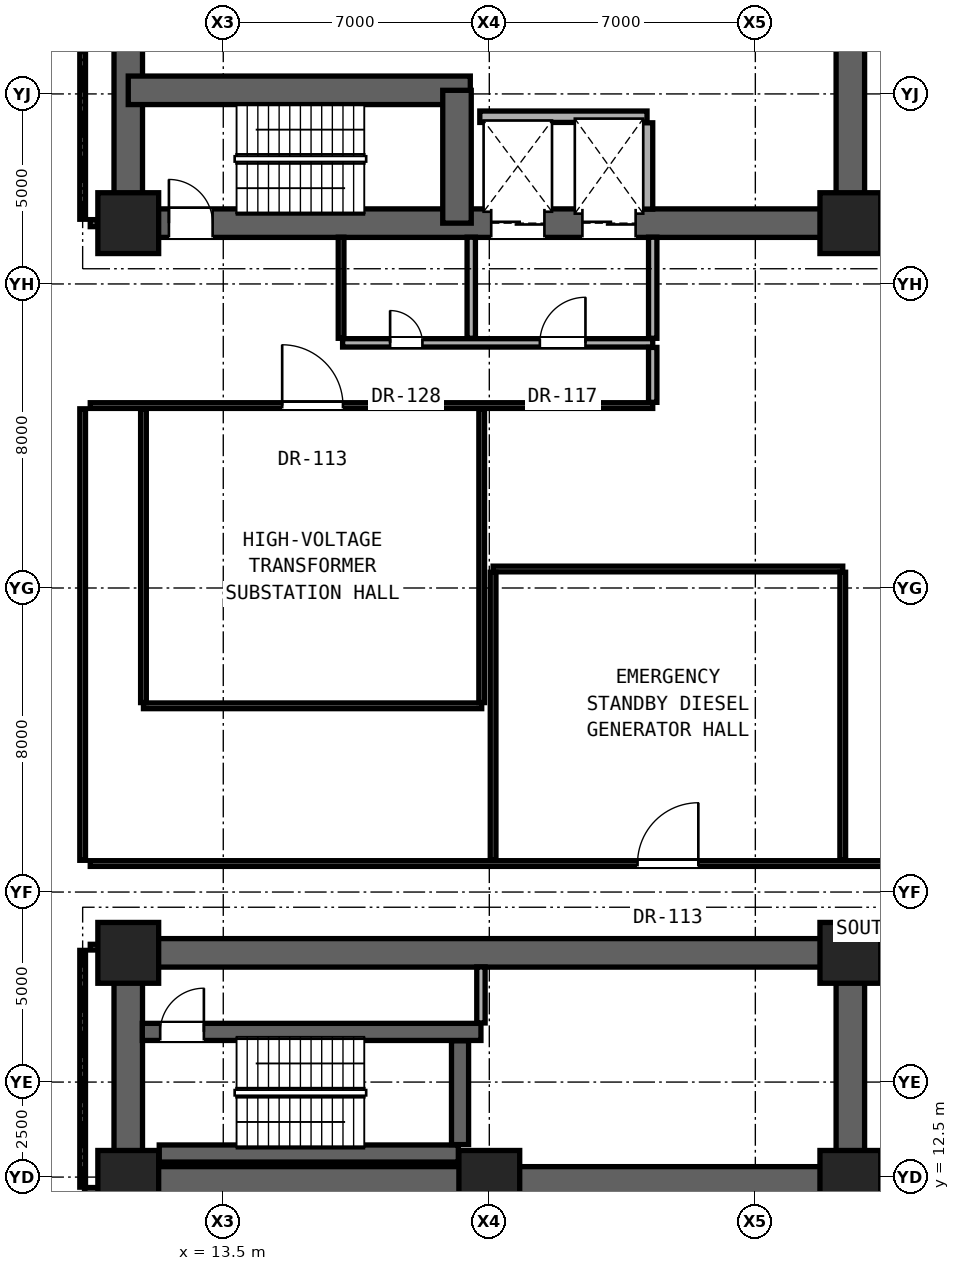
"""IFC4 building model, lengths in metres.
Left out: names, types, materials, properties, quantities, classifications, styles, units other than length and angle.
Written with IfcOpenShell. Run it as: python <this file> out.ifc"""

import sys

from ifc_helpers import new_model, si_unit, direction, frame, frame_2d, origin, origin_2d, place, context, subcontext, project, spatial, rectangle, extrude, element, fill, save


model = new_model("IFC4")
c1 = context("Model", 3, precision=1e-05, world=origin(), true_north=direction((0.0, 1.0)))
c2 = subcontext(c1, "Body", "Model", "MODEL_VIEW")
j1 = project(units=[si_unit("LENGTHUNIT", "METRE"), si_unit("PLANEANGLEUNIT", "RADIAN")], contexts=[c1])
p1 = place(None, origin())
s1 = spatial("IfcSite", under=j1, at=p1, CompositionType="ELEMENT")
p2 = place(p1, origin())
s2 = spatial("IfcBuilding", under=s1, at=p2, CompositionType="ELEMENT")
p3 = place(p2, frame((0.0, 0.0, -4.8)))
s3 = spatial("IfcBuildingStorey", under=s2, at=p3, CompositionType="ELEMENT", Elevation=-4.8)
for number, where, z_axis, x_axis in (
    (1, (11.0, 12.4, 0.0), (0.0, 0.0, 1.0), (1.0, 0.0, 0.0)),
    (2, (20.5, 12.4, 0.0), (0.0, 0.0, 1.0), (1.0, 0.0, 0.0)),
    (3, (30.0, 12.4, 0.0), (0.0, 0.0, 1.0), (1.0, 0.0, 0.0)),
    (4, (11.0, 18.4, 0.0), (0.0, 0.0, 1.0), (1.0, 0.0, 0.0)),
    (5, (30.0, 18.4, 0.0), (0.0, 0.0, 1.0), (1.0, 0.0, 0.0)),
    (6, (11.0, 37.6, 0.0), (0.0, 0.0, 1.0), (1.0, 0.0, 0.0)),
    (7, (30.0, 37.6, 0.0), (0.0, 0.0, 1.0), (1.0, 0.0, 0.0)),
):
    element("IfcColumn", number, at=place(p3, frame(where, z_axis=z_axis, x_axis=x_axis)), inside=s3, PredefinedType="COLUMN", context=c2, shape_type="SweptSolid", body=[
        extrude(rectangle(XDim=1.6, YDim=1.6, at=origin_2d()), origin(), (0.0, 0.0, 1.0), 4.8),
    ])
for number, where, z_axis, x_axis in (
    (8, (11.0, 37.6, 0.0), (0.0, 0.0, 1.0), (0.0, 1.0, 0.0)),
    (9, (30.0, 37.6, 0.0), (0.0, 0.0, 1.0), (0.0, 1.0, 0.0)),
):
    element("IfcWall", number, at=place(p3, frame(where, z_axis=z_axis, x_axis=x_axis)), inside=s3, PredefinedType="SHEAR", context=c2, shape_type="SweptSolid", body=[
        extrude(rectangle(XDim=6.0, YDim=0.75, at=frame_2d((3.0, 0.0))), origin(), (0.0, 0.0, 1.0), 4.48),
    ])
p4 = place(p3, frame((11.0, 37.6, 0.0), z_axis=(0.0, 0.0, 1.0), x_axis=(1.0, 0.0, 0.0)))
e10 = element("IfcWall", 10, at=p4, inside=s3, PredefinedType="SHEAR", context=c2, shape_type="SweptSolid", body=[
    extrude(rectangle(XDim=19.0, YDim=0.75, at=frame_2d((9.5, 0.0))), origin(), (0.0, 0.0, 1.0), 4.48),
])
p5 = place(p4, frame((1.07, 0.0, 0.0)))
e11 = element("IfcOpeningElement", 11, at=p5, cuts=e10, PredefinedType="OPENING", context=c2, shape_type="SweptSolid", body=[
    extrude(rectangle(XDim=1.15, YDim=2.2, at=frame_2d((0.575, 1.1))), frame((0.0, 0.385, 0.0), z_axis=(0.0, -1.0, 0.0), x_axis=(1.0, 0.0, 0.0)), (0.0, 0.0, 1.0), 0.77),
])
p6 = place(p4, frame((9.55, 0.0, 0.0)))
e12 = element("IfcOpeningElement", 12, at=p6, cuts=e10, PredefinedType="OPENING", context=c2, shape_type="SweptSolid", body=[
    extrude(rectangle(XDim=1.4, YDim=2.35, at=frame_2d((0.7, 1.175))), frame((0.0, 0.385, 0.0), z_axis=(0.0, -1.0, 0.0), x_axis=(1.0, 0.0, 0.0)), (0.0, 0.0, 1.0), 0.77),
])
p7 = place(p4, frame((11.95, 0.0, 0.0)))
e13 = element("IfcOpeningElement", 13, at=p7, cuts=e10, PredefinedType="OPENING", context=c2, shape_type="SweptSolid", body=[
    extrude(rectangle(XDim=1.4, YDim=2.35, at=frame_2d((0.7, 1.175))), frame((0.0, 0.385, 0.0), z_axis=(0.0, -1.0, 0.0), x_axis=(1.0, 0.0, 0.0)), (0.0, 0.0, 1.0), 0.77),
])
p8 = place(p3, frame((11.0, 41.095, 0.0), z_axis=(0.0, 0.0, 1.0), x_axis=(1.0, 0.0, 0.0)))
e14 = element("IfcWall", 14, at=p8, inside=s3, PredefinedType="SHEAR", context=c2, shape_type="SweptSolid", body=[
    extrude(rectangle(XDim=9.0, YDim=0.75, at=frame_2d((4.5, 0.0))), origin(), (0.0, 0.0, 1.0), 4.48),
])
p9 = place(p3, frame((19.65, 37.6, 0.0), z_axis=(0.0, 0.0, 1.0), x_axis=(0.0, 1.0, 0.0)))
e15 = element("IfcWall", 15, at=p9, inside=s3, PredefinedType="SHEAR", context=c2, shape_type="SweptSolid", body=[
    extrude(rectangle(XDim=3.495, YDim=0.75, at=frame_2d((1.748, 0.0))), origin(), (0.0, 0.0, 1.0), 4.48),
])
p10 = place(p3, frame((11.0, 12.4, 0.0), z_axis=(0.0, 0.0, 1.0), x_axis=(1.0, 0.0, 0.0)))
e16 = element("IfcWall", 16, at=p10, inside=s3, PredefinedType="SHEAR", context=c2, shape_type="SweptSolid", body=[
    extrude(rectangle(XDim=19.0, YDim=0.75, at=frame_2d((9.5, 0.0))), origin(), (0.0, 0.0, 1.0), 4.48),
])
for number, where, z_axis, x_axis in (
    (17, (11.0, 12.4, 0.0), (0.0, 0.0, 1.0), (0.0, 1.0, 0.0)),
    (18, (30.0, 12.4, 0.0), (0.0, 0.0, 1.0), (0.0, 1.0, 0.0)),
):
    element("IfcWall", number, at=place(p3, frame(where, z_axis=z_axis, x_axis=x_axis)), inside=s3, PredefinedType="SHEAR", context=c2, shape_type="SweptSolid", body=[
        extrude(rectangle(XDim=6.0, YDim=0.75, at=frame_2d((3.0, 0.0))), origin(), (0.0, 0.0, 1.0), 4.48),
    ])
p11 = place(p3, frame((11.0, 18.4, 0.0), z_axis=(0.0, 0.0, 1.0), x_axis=(1.0, 0.0, 0.0)))
e19 = element("IfcWall", 19, at=p11, inside=s3, PredefinedType="SHEAR", context=c2, shape_type="SweptSolid", body=[
    extrude(rectangle(XDim=19.0, YDim=0.75, at=frame_2d((9.5, 0.0))), origin(), (0.0, 0.0, 1.0), 4.48),
])
p12 = place(p3, frame((9.85, 12.15, 0.0), z_axis=(0.0, 0.0, 1.0), x_axis=(1.0, 0.0, 0.0)))
e20 = element("IfcWall", 20, at=p12, inside=s3, PredefinedType="PARTITIONING", context=c2, shape_type="SweptSolid", body=[
    extrude(rectangle(XDim=1.13, YDim=0.15, at=frame_2d((0.565, 0.0))), origin(), (0.0, 0.0, 1.0), 3.519),
])
p13 = place(p3, frame((30.02, 12.15, 0.0), z_axis=(0.0, 0.0, 1.0), x_axis=(1.0, 0.0, 0.0)))
e21 = element("IfcWall", 21, at=p13, inside=s3, PredefinedType="PARTITIONING", context=c2, shape_type="SweptSolid", body=[
    extrude(rectangle(XDim=13.13, YDim=0.15, at=frame_2d((6.565, 0.0))), origin(), (0.0, 0.0, 1.0), 3.252),
])
p14 = place(p3, frame((11.815, 13.12, 0.0), z_axis=(0.0, 0.0, 1.0), x_axis=(1.0, 0.0, 0.0)))
e22 = element("IfcWall", 22, at=p14, inside=s3, PredefinedType="SHEAR", context=c2, shape_type="SweptSolid", body=[
    extrude(rectangle(XDim=7.87, YDim=0.45, at=frame_2d((3.935, 0.0))), origin(), (0.0, 0.0, 1.0), 4.48),
])
p15 = place(p3, frame((11.37, 16.32, 0.0), z_axis=(0.0, 0.0, 1.0), x_axis=(1.0, 0.0, 0.0)))
e23 = element("IfcWall", 23, at=p15, inside=s3, PredefinedType="SHEAR", context=c2, shape_type="SweptSolid", body=[
    extrude(rectangle(XDim=8.91, YDim=0.45, at=frame_2d((4.455, 0.0))), origin(), (0.0, 0.0, 1.0), 4.48),
])
p16 = place(p15, frame((0.47, 0.0, 0.0)))
e24 = element("IfcOpeningElement", 24, at=p16, cuts=e23, PredefinedType="OPENING", context=c2, shape_type="SweptSolid", body=[
    extrude(rectangle(XDim=1.15, YDim=2.2, at=frame_2d((0.575, 1.1))), frame((0.0, 0.235, 0.0), z_axis=(0.0, -1.0, 0.0), x_axis=(1.0, 0.0, 0.0)), (0.0, 0.0, 1.0), 0.47),
])
p17 = place(p3, frame((10.0, 18.55, 0.0), z_axis=(0.0, 0.0, 1.0), x_axis=(1.0, 0.0, 0.0)))
e25 = element("IfcWall", 25, at=p17, inside=s3, PredefinedType="PARTITIONING", context=c2, shape_type="SweptSolid", body=[
    extrude(rectangle(XDim=0.98, YDim=0.15, at=frame_2d((0.49, 0.0))), origin(), (0.0, 0.0, 1.0), 3.372),
])
p18 = place(p3, frame((30.02, 18.55, 0.0), z_axis=(0.0, 0.0, 1.0), x_axis=(1.0, 0.0, 0.0)))
e26 = element("IfcWall", 26, at=p18, inside=s3, PredefinedType="PARTITIONING", context=c2, shape_type="SweptSolid", body=[
    extrude(rectangle(XDim=13.18, YDim=0.15, at=frame_2d((6.59, 0.0))), origin(), (0.0, 0.0, 1.0), 3.252),
])
p19 = place(p3, frame((10.0, 20.75, 0.0), z_axis=(0.0, 0.0, 1.0), x_axis=(1.0, 0.0, 0.0)))
e27 = element("IfcWall", 27, at=p19, inside=s3, PredefinedType="PARTITIONING", context=c2, shape_type="SweptSolid", body=[
    extrude(rectangle(XDim=33.2, YDim=0.15, at=frame_2d((16.6, 0.0))), origin(), (0.0, 0.0, 1.0), 3.252),
])
p20 = place(p19, frame((14.4, 0.0, 0.0)))
e28 = element("IfcOpeningElement", 28, at=p20, cuts=e27, PredefinedType="OPENING", context=c2, shape_type="SweptSolid", body=[
    extrude(rectangle(XDim=1.6, YDim=2.3, at=frame_2d((0.8, 1.15))), frame((0.0, 0.085, 0.0), z_axis=(0.0, -1.0, 0.0), x_axis=(1.0, 0.0, 0.0)), (0.0, 0.0, 1.0), 0.17),
])
p21 = place(p3, frame((11.4, 24.9, 0.0), z_axis=(0.0, 0.0, 1.0), x_axis=(1.0, 0.0, 0.0)))
e29 = element("IfcWall", 29, at=p21, inside=s3, PredefinedType="PARTITIONING", context=c2, shape_type="SweptSolid", body=[
    extrude(rectangle(XDim=8.9, YDim=0.15, at=frame_2d((4.45, 0.0))), origin(), (0.0, 0.0, 1.0), 3.432),
])
p22 = place(p3, frame((20.6, 28.5, 0.0), z_axis=(0.0, 0.0, 1.0), x_axis=(1.0, 0.0, 0.0)))
e30 = element("IfcWall", 30, at=p22, inside=s3, PredefinedType="PARTITIONING", context=c2, shape_type="SweptSolid", body=[
    extrude(rectangle(XDim=9.2, YDim=0.15, at=frame_2d((4.6, 0.0))), origin(), (0.0, 0.0, 1.0), 3.432),
])
p23 = place(p3, frame((10.0, 32.8, 0.0), z_axis=(0.0, 0.0, 1.0), x_axis=(1.0, 0.0, 0.0)))
e31 = element("IfcWall", 31, at=p23, inside=s3, PredefinedType="PARTITIONING", context=c2, shape_type="SweptSolid", body=[
    extrude(rectangle(XDim=14.8, YDim=0.15, at=frame_2d((7.4, 0.0))), origin(), (0.0, 0.0, 1.0), 3.432),
])
p24 = place(p23, frame((5.05, 0.0, 0.0)))
e32 = element("IfcOpeningElement", 32, at=p24, cuts=e31, PredefinedType="OPENING", context=c2, shape_type="SweptSolid", body=[
    extrude(rectangle(XDim=1.6, YDim=2.3, at=frame_2d((0.8, 1.15))), frame((0.0, 0.085, 0.0), z_axis=(0.0, -1.0, 0.0), x_axis=(1.0, 0.0, 0.0)), (0.0, 0.0, 1.0), 0.17),
])
p25 = place(p3, frame((16.64, 34.45, 0.0), z_axis=(0.0, 0.0, 1.0), x_axis=(1.0, 0.0, 0.0)))
e33 = element("IfcWall", 33, at=p25, inside=s3, PredefinedType="SOLIDWALL", context=c2, shape_type="SweptSolid", body=[
    extrude(rectangle(XDim=8.16, YDim=0.22, at=frame_2d((4.08, 0.0))), origin(), (0.0, 0.0, 1.0), 4.009),
])
p26 = place(p25, frame((5.19, 0.0, 0.0)))
e34 = element("IfcOpeningElement", 34, at=p26, cuts=e33, PredefinedType="OPENING", context=c2, shape_type="SweptSolid", body=[
    extrude(rectangle(XDim=1.2, YDim=2.25, at=frame_2d((0.6, 1.125))), frame((0.0, 0.12, 0.0), z_axis=(0.0, -1.0, 0.0), x_axis=(1.0, 0.0, 0.0)), (0.0, 0.0, 1.0), 0.24),
])
p27 = place(p25, frame((1.25, 0.0, 0.0)))
e35 = element("IfcOpeningElement", 35, at=p27, cuts=e33, PredefinedType="OPENING", context=c2, shape_type="SweptSolid", body=[
    extrude(rectangle(XDim=0.85, YDim=2.01, at=frame_2d((0.425, 1.005))), frame((0.0, 0.12, 0.0), z_axis=(0.0, -1.0, 0.0), x_axis=(1.0, 0.0, 0.0)), (0.0, 0.0, 1.0), 0.24),
])
p28 = place(p3, frame((10.0, 37.6, 0.0), z_axis=(0.0, 0.0, 1.0), x_axis=(1.0, 0.0, 0.0)))
e36 = element("IfcWall", 36, at=p28, inside=s3, PredefinedType="SHEAR", context=c2, shape_type="SweptSolid", body=[
    extrude(rectangle(XDim=0.185, YDim=0.185, at=frame_2d((0.093, 0.0))), origin(), (0.0, 0.0, 1.0), 4.48),
])
p29 = place(p3, frame((20.25, 40.4, 0.0), z_axis=(0.0, 0.0, 1.0), x_axis=(1.0, 0.0, 0.0)))
e37 = element("IfcWall", 37, at=p29, inside=s3, PredefinedType="SOLIDWALL", context=c2, shape_type="SweptSolid", body=[
    extrude(rectangle(XDim=4.4, YDim=0.3, at=frame_2d((2.2, 0.0))), origin(), (0.0, 0.0, 1.0), 4.3),
])
p30 = place(p3, frame((9.8, 12.235, 0.0), z_axis=(0.0, 0.0, 1.0), x_axis=(0.0, 1.0, 0.0)))
e38 = element("IfcWall", 38, at=p30, inside=s3, PredefinedType="PARTITIONING", context=c2, shape_type="SweptSolid", body=[
    extrude(rectangle(XDim=6.23, YDim=0.15, at=frame_2d((3.115, 0.0))), origin(), (0.0, 0.0, 1.0), 3.372),
])
p31 = place(p3, frame((9.8, 20.835, 0.0), z_axis=(0.0, 0.0, 1.0), x_axis=(0.0, 1.0, 0.0)))
e39 = element("IfcWall", 39, at=p31, inside=s3, PredefinedType="PARTITIONING", context=c2, shape_type="SweptSolid", body=[
    extrude(rectangle(XDim=11.88, YDim=0.15, at=frame_2d((5.94, 0.0))), origin(), (0.0, 0.0, 1.0), 3.699),
])
p32 = place(p3, frame((9.8, 37.702, 0.0), z_axis=(0.0, 0.0, 1.0), x_axis=(0.0, 1.0, 0.0)))
e40 = element("IfcWall", 40, at=p32, inside=s3, PredefinedType="PARTITIONING", context=c2, shape_type="SweptSolid", body=[
    extrude(rectangle(XDim=9.348, YDim=0.15, at=frame_2d((4.674, 0.0))), origin(), (0.0, 0.0, 1.0), 3.372),
])
p33 = place(p3, frame((11.4, 24.985, 0.0), z_axis=(0.0, 0.0, 1.0), x_axis=(0.0, 1.0, 0.0)))
e41 = element("IfcWall", 41, at=p33, inside=s3, PredefinedType="PARTITIONING", context=c2, shape_type="SweptSolid", body=[
    extrude(rectangle(XDim=7.73, YDim=0.15, at=frame_2d((3.865, 0.0))), origin(), (0.0, 0.0, 1.0), 3.432),
])
p34 = place(p3, frame((16.6, 34.57, 0.0), z_axis=(0.0, 0.0, 1.0), x_axis=(0.0, 1.0, 0.0)))
e42 = element("IfcWall", 42, at=p34, inside=s3, PredefinedType="PARTITIONING", context=c2, shape_type="SweptSolid", body=[
    extrude(rectangle(XDim=2.66, YDim=0.15, at=frame_2d((1.33, 0.0))), origin(), (0.0, 0.0, 1.0), 4.3),
])
p35 = place(p3, frame((19.73, 13.355, 0.0), z_axis=(0.0, 0.0, 1.0), x_axis=(0.0, 1.0, 0.0)))
e43 = element("IfcWall", 43, at=p35, inside=s3, PredefinedType="SHEAR", context=c2, shape_type="SweptSolid", body=[
    extrude(rectangle(XDim=2.73, YDim=0.45, at=frame_2d((1.365, 0.0))), origin(), (0.0, 0.0, 1.0), 4.48),
])
p36 = place(p3, frame((20.025, 34.57, 0.0), z_axis=(0.0, 0.0, 1.0), x_axis=(0.0, 1.0, 0.0)))
e44 = element("IfcWall", 44, at=p36, inside=s3, PredefinedType="SOLIDWALL", context=c2, shape_type="SweptSolid", body=[
    extrude(rectangle(XDim=2.66, YDim=0.22, at=frame_2d((1.33, 0.0))), origin(), (0.0, 0.0, 1.0), 4.3),
])
p37 = place(p3, frame((20.28, 16.555, 0.0), z_axis=(0.0, 0.0, 1.0), x_axis=(0.0, 1.0, 0.0)))
e45 = element("IfcWall", 45, at=p37, inside=s3, PredefinedType="SOLIDWALL", context=c2, shape_type="SweptSolid", body=[
    extrude(rectangle(XDim=1.475, YDim=0.22, at=frame_2d((0.738, 0.0))), origin(), (0.0, 0.0, 1.0), 4.3),
])
p38 = place(p3, frame((20.3, 24.985, 0.0), z_axis=(0.0, 0.0, 1.0), x_axis=(0.0, 1.0, 0.0)))
e46 = element("IfcWall", 46, at=p38, inside=s3, PredefinedType="PARTITIONING", context=c2, shape_type="SweptSolid", body=[
    extrude(rectangle(XDim=7.73, YDim=0.15, at=frame_2d((3.865, 0.0))), origin(), (0.0, 0.0, 1.0), 3.432),
])
p39 = place(p3, frame((20.6, 20.85, 0.0), z_axis=(0.0, 0.0, 1.0), x_axis=(0.0, 1.0, 0.0)))
e47 = element("IfcWall", 47, at=p39, inside=s3, PredefinedType="PARTITIONING", context=c2, shape_type="SweptSolid", body=[
    extrude(rectangle(XDim=7.565, YDim=0.15, at=frame_2d((3.782, 0.0))), origin(), (0.0, 0.0, 1.0), 3.432),
])
p40 = place(p3, frame((24.65, 37.97, 0.0), z_axis=(0.0, 0.0, 1.0), x_axis=(0.0, 1.0, 0.0)))
e48 = element("IfcWall", 48, at=p40, inside=s3, PredefinedType="SOLIDWALL", context=c2, shape_type="SweptSolid", body=[
    extrude(rectangle(XDim=2.27, YDim=0.3, at=frame_2d((1.135, 0.0))), origin(), (0.0, 0.0, 1.0), 4.3),
])
p41 = place(p3, frame((24.8, 32.885, 0.0), z_axis=(0.0, 0.0, 1.0), x_axis=(0.0, 1.0, 0.0)))
e49 = element("IfcWall", 49, at=p41, inside=s3, PredefinedType="SOLIDWALL", context=c2, shape_type="SweptSolid", body=[
    extrude(rectangle(XDim=1.445, YDim=0.22, at=frame_2d((0.723, 0.0))), origin(), (0.0, 0.0, 1.0), 4.3),
])
p42 = place(p3, frame((24.8, 34.57, 0.0), z_axis=(0.0, 0.0, 1.0), x_axis=(0.0, 1.0, 0.0)))
e50 = element("IfcWall", 50, at=p42, inside=s3, PredefinedType="SOLIDWALL", context=c2, shape_type="SweptSolid", body=[
    extrude(rectangle(XDim=2.66, YDim=0.22, at=frame_2d((1.33, 0.0))), origin(), (0.0, 0.0, 1.0), 4.3),
])
p43 = place(p3, frame((29.8, 20.85, 0.0), z_axis=(0.0, 0.0, 1.0), x_axis=(0.0, 1.0, 0.0)))
e51 = element("IfcWall", 51, at=p43, inside=s3, PredefinedType="PARTITIONING", context=c2, shape_type="SweptSolid", body=[
    extrude(rectangle(XDim=7.565, YDim=0.15, at=frame_2d((3.782, 0.0))), origin(), (0.0, 0.0, 1.0), 3.432),
])
p44 = place(p5, origin())
e52 = element("IfcDoor", 52, at=p44, inside=s3, OperationType="SINGLE_SWING_LEFT", PredefinedType="DOOR", context=c2, shape_type="SweptSolid", body=[
    extrude(rectangle(XDim=1.15, YDim=2.2, at=frame_2d((0.575, 1.1))), frame((0.0, 0.025, 0.0), z_axis=(0.0, -1.0, 0.0), x_axis=(1.0, 0.0, 0.0)), (0.0, 0.0, 1.0), 0.05),
])
fill(e11, e52)
p45 = place(p26, origin())
e53 = element("IfcDoor", 53, at=p45, inside=s3, OperationType="SINGLE_SWING_RIGHT", PredefinedType="DOOR", context=c2, shape_type="SweptSolid", body=[
    extrude(rectangle(XDim=1.2, YDim=2.25, at=frame_2d((0.6, 1.125))), frame((0.0, 0.025, 0.0), z_axis=(0.0, -1.0, 0.0), x_axis=(1.0, 0.0, 0.0)), (0.0, 0.0, 1.0), 0.05),
])
fill(e34, e53)
p46 = place(p27, origin())
e54 = element("IfcDoor", 54, at=p46, inside=s3, OperationType="SINGLE_SWING_LEFT", PredefinedType="DOOR", context=c2, shape_type="SweptSolid", body=[
    extrude(rectangle(XDim=0.85, YDim=2.01, at=frame_2d((0.425, 1.005))), frame((0.0, 0.025, 0.0), z_axis=(0.0, -1.0, 0.0), x_axis=(1.0, 0.0, 0.0)), (0.0, 0.0, 1.0), 0.05),
])
fill(e35, e54)
p47 = place(p16, origin())
e55 = element("IfcDoor", 55, at=p47, inside=s3, OperationType="SINGLE_SWING_RIGHT", PredefinedType="DOOR", context=c2, shape_type="SweptSolid", body=[
    extrude(rectangle(XDim=1.15, YDim=2.2, at=frame_2d((0.575, 1.1))), frame((0.0, 0.025, 0.0), z_axis=(0.0, -1.0, 0.0), x_axis=(1.0, 0.0, 0.0)), (0.0, 0.0, 1.0), 0.05),
])
fill(e24, e55)
p48 = place(p24, origin())
e56 = element("IfcDoor", 56, at=p48, inside=s3, OperationType="SINGLE_SWING_LEFT", PredefinedType="DOOR", context=c2, shape_type="SweptSolid", body=[
    extrude(rectangle(XDim=1.6, YDim=2.3, at=frame_2d((0.8, 1.15))), frame((0.0, 0.025, 0.0), z_axis=(0.0, -1.0, 0.0), x_axis=(1.0, 0.0, 0.0)), (0.0, 0.0, 1.0), 0.05),
])
fill(e32, e56)
p49 = place(p20, origin())
e57 = element("IfcDoor", 57, at=p49, inside=s3, OperationType="SINGLE_SWING_RIGHT", PredefinedType="DOOR", context=c2, shape_type="SweptSolid", body=[
    extrude(rectangle(XDim=1.6, YDim=2.3, at=frame_2d((0.8, 1.15))), frame((0.0, 0.025, 0.0), z_axis=(0.0, -1.0, 0.0), x_axis=(1.0, 0.0, 0.0)), (0.0, 0.0, 1.0), 0.05),
])
fill(e28, e57)
p50 = place(p6, origin())
e58 = element("IfcDoor", 58, at=p50, inside=s3, OperationType="DOUBLE_DOOR_SLIDING", PredefinedType="DOOR", context=c2, shape_type="SweptSolid", body=[
    extrude(rectangle(XDim=1.4, YDim=2.35, at=frame_2d((0.7, 1.175))), frame((0.0, 0.025, 0.0), z_axis=(0.0, -1.0, 0.0), x_axis=(1.0, 0.0, 0.0)), (0.0, 0.0, 1.0), 0.05),
])
fill(e12, e58)
p51 = place(p7, origin())
e59 = element("IfcDoor", 59, at=p51, inside=s3, OperationType="DOUBLE_DOOR_SLIDING", PredefinedType="DOOR", context=c2, shape_type="SweptSolid", body=[
    extrude(rectangle(XDim=1.4, YDim=2.35, at=frame_2d((0.7, 1.175))), frame((0.0, 0.025, 0.0), z_axis=(0.0, -1.0, 0.0), x_axis=(1.0, 0.0, 0.0)), (0.0, 0.0, 1.0), 0.05),
])
fill(e13, e59)
save(model, sys.argv[1])
